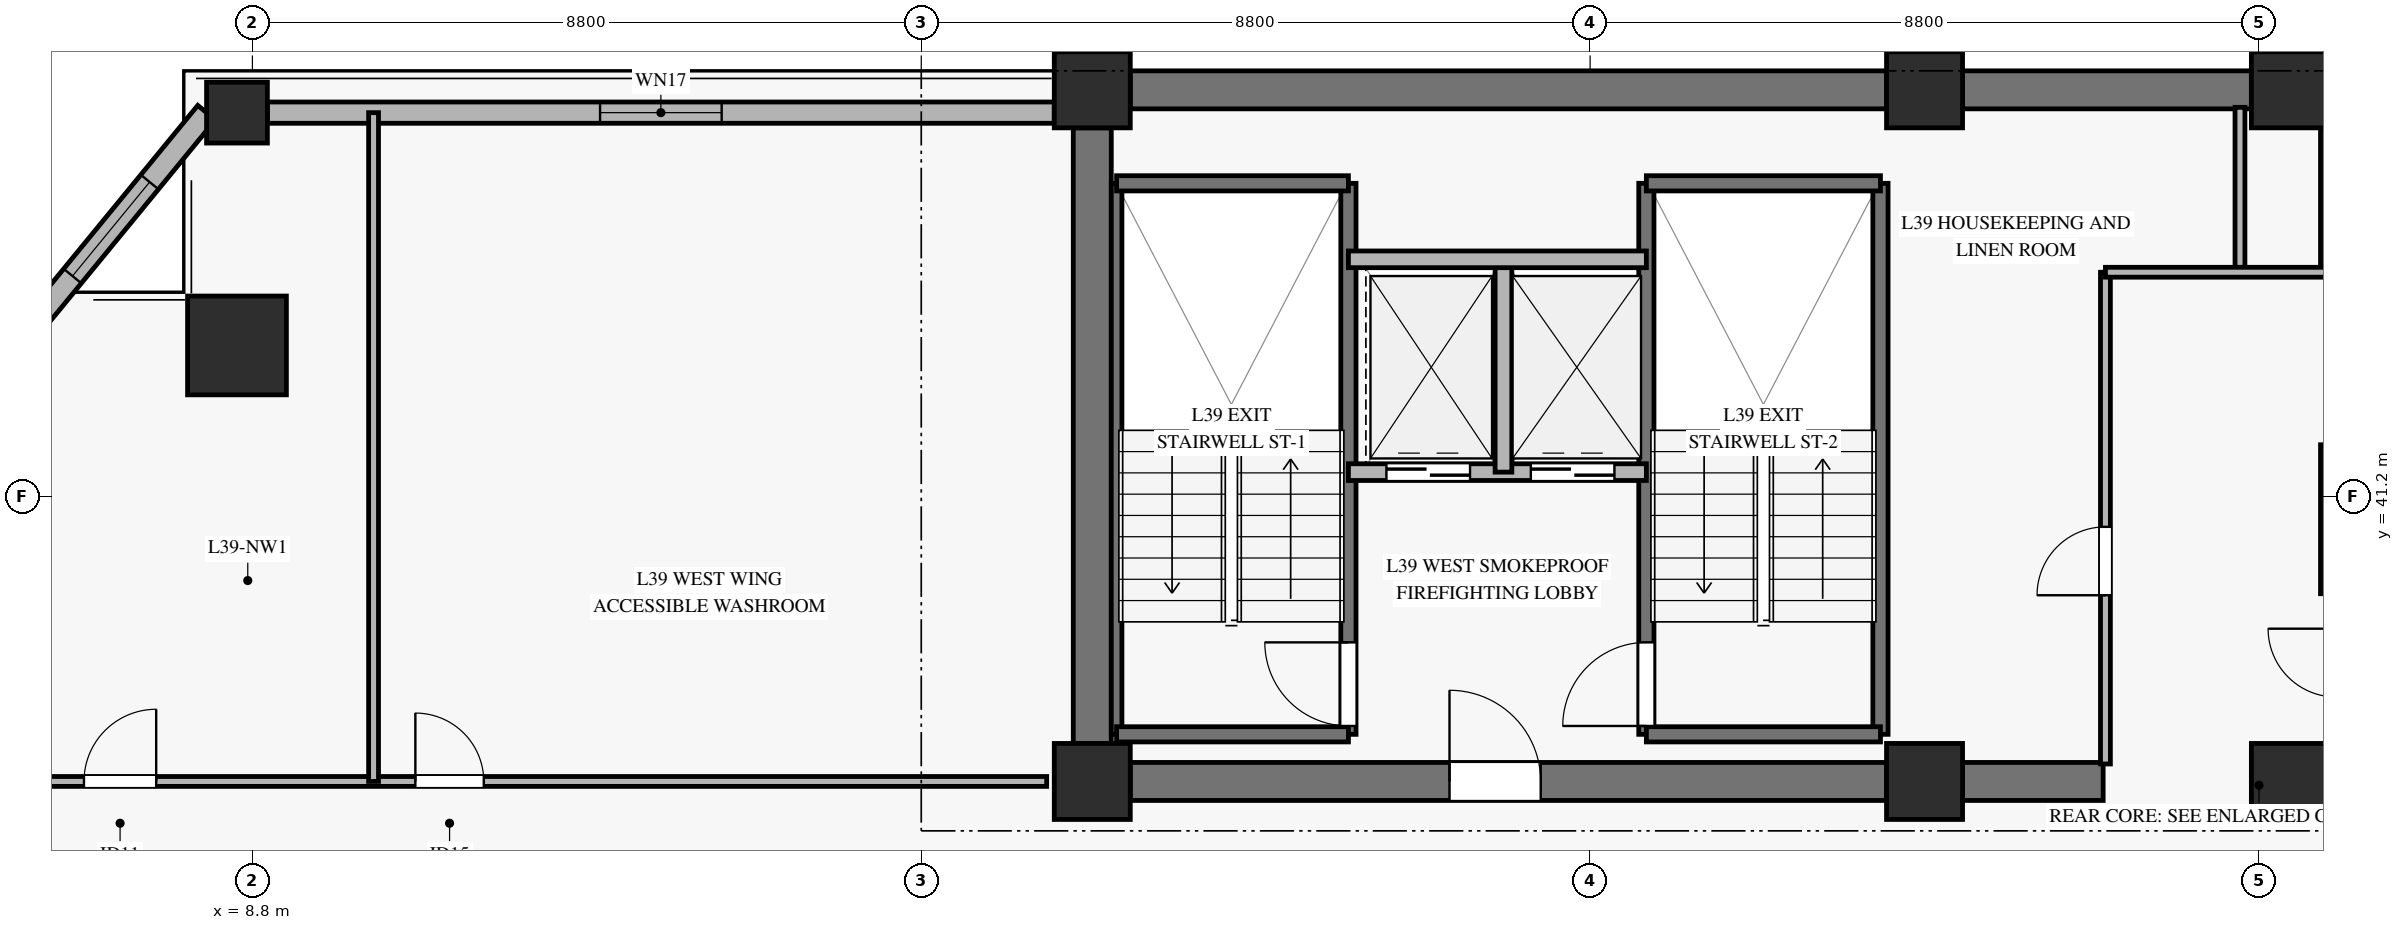
"""IFC4 building model, lengths in metres.
Left out: names, types, materials, properties, quantities, classifications, styles, units other than length and angle.
Written with IfcOpenShell. Run it as: python <this file> out.ifc"""

import sys

from ifc_helpers import new_model, si_unit, direction, frame, frame_2d, origin, origin_2d, place, context, subcontext, project, spatial, rectangle, hollow_rectangle, extrude, source, transform, mapped, element, fill, save


model = new_model("IFC4")
c1 = context("Model", 3, precision=1e-05, world=origin(), true_north=direction((0.0, 1.0)))
c2 = subcontext(c1, "Body", "Model", "MODEL_VIEW")
j1 = project(units=[si_unit("LENGTHUNIT", "METRE"), si_unit("PLANEANGLEUNIT", "RADIAN")], contexts=[c1])
p1 = place(None, origin())
s1 = spatial("IfcSite", under=j1, at=p1, CompositionType="ELEMENT")
p2 = place(p1, origin())
s2 = spatial("IfcBuilding", under=s1, at=p2, CompositionType="ELEMENT")
p3 = place(p2, frame((0.0, 0.0, 159.7)))
s3 = spatial("IfcBuildingStorey", under=s2, at=p3, CompositionType="ELEMENT", Elevation=159.7)
m1 = source(origin(), c2, "Body", "SweptSolid", [
    extrude(rectangle(XDim=1.0, YDim=1.0, at=origin_2d()), origin(), (0.0, 0.0, 1.0), 3.27),
])
for number, where, z_axis, x_axis in (
    (1, (19.85, 37.45, 0.0), (0.0, 0.0, 1.0), (1.0, 0.0, 0.0)),
    (2, (19.85, 46.55, 0.0), (0.0, 0.0, 1.0), (1.0, 0.0, 0.0)),
    (3, (30.8, 37.45, 0.0), (0.0, 0.0, 1.0), (1.0, 0.0, 0.0)),
    (4, (30.8, 46.55, 0.0), (0.0, 0.0, 1.0), (1.0, 0.0, 0.0)),
    (5, (35.6, 37.45, 0.0), (0.0, 0.0, 1.0), (1.0, 0.0, 0.0)),
    (6, (35.6, 46.55, 0.0), (0.0, 0.0, 1.0), (1.0, 0.0, 0.0)),
):
    element("IfcColumn", number, at=place(p3, frame(where, z_axis=z_axis, x_axis=x_axis)), inside=s3, PredefinedType="PILASTER", context=c2, shape_type="MappedRepresentation", body=[
        mapped(m1, transform((0.0, 0.0, 0.0), x_axis=(1.0, 0.0, 0.0), y_axis=(0.0, 1.0, 0.0), z_axis=(0.0, 0.0, 1.0), scale=1.0)),
    ])
p4 = place(p3, frame((20.35, 46.55, 0.0), z_axis=(0.0, 0.0, 1.0), x_axis=(1.0, 0.0, 0.0)))
e7 = element("IfcWall", 7, at=p4, inside=s3, PredefinedType="SHEAR", context=c2, shape_type="SweptSolid", body=[
    extrude(rectangle(XDim=9.95, YDim=0.5, at=frame_2d((4.975, 0.0))), origin(), (0.0, 0.0, 1.0), 3.27),
])
p5 = place(p3, frame((31.3, 46.55, 0.0), z_axis=(0.0, 0.0, 1.0), x_axis=(1.0, 0.0, 0.0)))
e8 = element("IfcWall", 8, at=p5, inside=s3, PredefinedType="SHEAR", context=c2, shape_type="SweptSolid", body=[
    extrude(rectangle(XDim=3.8, YDim=0.5, at=frame_2d((1.9, 0.0))), origin(), (0.0, 0.0, 1.0), 3.27),
])
p6 = place(p3, frame((20.35, 37.45, 0.0), z_axis=(0.0, 0.0, 1.0), x_axis=(1.0, 0.0, 0.0)))
e9 = element("IfcWall", 9, at=p6, inside=s3, PredefinedType="SHEAR", context=c2, shape_type="SweptSolid", body=[
    extrude(rectangle(XDim=9.95, YDim=0.5, at=frame_2d((4.975, 0.0))), origin(), (0.0, 0.0, 1.0), 3.27),
])
p7 = place(p6, frame((4.2, 0.0, 0.0)))
e10 = element("IfcOpeningElement", 10, at=p7, cuts=e9, PredefinedType="OPENING", context=c2, shape_type="SweptSolid", body=[
    extrude(rectangle(XDim=1.2, YDim=2.15, at=frame_2d((0.6, 1.075))), frame((0.0, 0.26, 0.0), z_axis=(0.0, -1.0, 0.0), x_axis=(1.0, 0.0, 0.0)), (0.0, 0.0, 1.0), 0.52),
])
p8 = place(p3, frame((31.3, 37.45, 0.0), z_axis=(0.0, 0.0, 1.0), x_axis=(1.0, 0.0, 0.0)))
e11 = element("IfcWall", 11, at=p8, inside=s3, PredefinedType="SHEAR", context=c2, shape_type="SweptSolid", body=[
    extrude(rectangle(XDim=1.85, YDim=0.5, at=frame_2d((0.925, 0.0))), origin(), (0.0, 0.0, 1.0), 3.27),
])
p9 = place(p3, frame((19.85, 37.95, 0.0), z_axis=(0.0, 0.0, 1.0), x_axis=(0.0, 1.0, 0.0)))
e12 = element("IfcWall", 12, at=p9, inside=s3, PredefinedType="SHEAR", context=c2, shape_type="SweptSolid", body=[
    extrude(rectangle(XDim=8.1, YDim=0.5, at=frame_2d((4.05, 0.0))), origin(), (0.0, 0.0, 1.0), 3.27),
])
m2 = source(origin(), c2, "Body", "SweptSolid", [
    extrude(hollow_rectangle(XDim=1.3, YDim=1.3, WallThickness=0.06, at=origin_2d()), origin(), (0.0, 0.0, 1.0), 3.27),
])
p10 = place(p3, frame((8.597, 43.187, 0.0), z_axis=(0.0, 0.0, 1.0), x_axis=(1.0, 0.0, 0.0)))
e13 = element("IfcColumn", 13, at=p10, inside=s3, PredefinedType="COLUMN", context=c2, shape_type="MappedRepresentation", body=[
    mapped(m2, transform((0.0, 0.0, 0.0), x_axis=(1.0, 0.0, 0.0), y_axis=(0.0, 1.0, 0.0), z_axis=(0.0, 0.0, 1.0), scale=1.0)),
])
m3 = source(origin(), c2, "Body", "SweptSolid", [
    extrude(hollow_rectangle(XDim=0.8, YDim=0.8, WallThickness=0.036, at=origin_2d()), origin(), (0.0, 0.0, 1.0), 3.27),
])
p11 = place(p3, frame((8.597, 46.25, 0.0), z_axis=(0.0, 0.0, 1.0), x_axis=(1.0, 0.0, 0.0)))
e14 = element("IfcColumn", 14, at=p11, inside=s3, PredefinedType="COLUMN", context=c2, shape_type="MappedRepresentation", body=[
    mapped(m3, transform((0.0, 0.0, 0.0), x_axis=(1.0, 0.0, 0.0), y_axis=(0.0, 1.0, 0.0), z_axis=(0.0, 0.0, 1.0), scale=1.0)),
])
p12 = place(p3, frame((8.997, 46.25, 0.0), z_axis=(0.0, 0.0, 1.0), x_axis=(1.0, 0.0, 0.0)))
e15 = element("IfcWall", 15, at=p12, inside=s3, PredefinedType="SOLIDWALL", context=c2, shape_type="SweptSolid", body=[
    extrude(rectangle(XDim=10.353, YDim=0.28, at=frame_2d((5.177, 0.0))), origin(), (0.0, 0.0, 1.0), 2.75),
])
p13 = place(p12, frame((4.377, 0.0, 0.45)))
e16 = element("IfcOpeningElement", 16, at=p13, cuts=e15, PredefinedType="OPENING", context=c2, shape_type="SweptSolid", body=[
    extrude(rectangle(XDim=1.6, YDim=2.0, at=frame_2d((0.8, 1.0))), frame((0.0, 0.15, 0.0), z_axis=(0.0, -1.0, 0.0), x_axis=(1.0, 0.0, 0.0)), (0.0, 0.0, 1.0), 0.3),
])
p14 = place(p3, frame((8.197, 46.25, 0.0), z_axis=(0.0, 0.0, 1.0), x_axis=(-0.634274117039, -0.773108235925, 0.0)))
e17 = element("IfcWall", 17, at=p14, inside=s3, PredefinedType="SOLIDWALL", context=c2, shape_type="SweptSolid", body=[
    extrude(rectangle(XDim=3.962, YDim=0.3, at=frame_2d((1.981, 0.0))), origin(), (0.0, 0.0, 1.0), 2.75),
])
p15 = place(p14, frame((1.181, 0.0, 0.45)))
e18 = element("IfcOpeningElement", 18, at=p15, cuts=e17, PredefinedType="OPENING", context=c2, shape_type="SweptSolid", body=[
    extrude(rectangle(XDim=1.6, YDim=2.0, at=frame_2d((0.8, 1.0))), frame((0.0, 0.16, 0.0), z_axis=(0.0, -1.0, 0.0), x_axis=(1.0, 0.0, 0.0)), (0.0, 0.0, 1.0), 0.32),
])
p16 = place(p3, frame((20.17, 38.07, 0.0), z_axis=(0.0, 0.0, 1.0), x_axis=(0.0, 1.0, 0.0)))
e19 = element("IfcWall", 19, at=p16, inside=s3, PredefinedType="SOLIDWALL", context=c2, shape_type="SweptSolid", body=[
    extrude(rectangle(XDim=7.25, YDim=0.14, at=frame_2d((3.625, 0.0))), origin(), (0.0, 0.0, 1.0), 3.5),
])
p17 = place(p3, frame((23.22, 38.07, 0.0), z_axis=(0.0, 0.0, 1.0), x_axis=(0.0, 1.0, 0.0)))
e20 = element("IfcWall", 20, at=p17, inside=s3, PredefinedType="SOLIDWALL", context=c2, shape_type="SweptSolid", body=[
    extrude(rectangle(XDim=7.25, YDim=0.2, at=frame_2d((3.625, 0.0))), origin(), (0.0, 0.0, 1.0), 3.5),
])
p18 = place(p17, frame((0.11, 0.0, 0.0)))
e21 = element("IfcOpeningElement", 21, at=p18, cuts=e20, PredefinedType="OPENING", context=c2, shape_type="SweptSolid", body=[
    extrude(rectangle(XDim=1.1, YDim=2.15, at=frame_2d((0.55, 1.075))), frame((0.0, 0.11, 0.0), z_axis=(0.0, -1.0, 0.0), x_axis=(1.0, 0.0, 0.0)), (0.0, 0.0, 1.0), 0.22),
])
for number, where, z_axis, x_axis in (
    (22, (20.17, 45.32, 0.0), (0.0, 0.0, 1.0), (1.0, 0.0, 0.0)),
    (23, (20.17, 38.07, 0.0), (0.0, 0.0, 1.0), (1.0, 0.0, 0.0)),
):
    element("IfcWall", number, at=place(p3, frame(where, z_axis=z_axis, x_axis=x_axis)), inside=s3, PredefinedType="SOLIDWALL", context=c2, shape_type="SweptSolid", body=[
        extrude(rectangle(XDim=3.05, YDim=0.2, at=frame_2d((1.525, 0.0))), origin(), (0.0, 0.0, 1.0), 3.5),
    ])
p19 = place(p3, frame((27.14, 38.07, 0.0), z_axis=(0.0, 0.0, 1.0), x_axis=(0.0, 1.0, 0.0)))
e24 = element("IfcWall", 24, at=p19, inside=s3, PredefinedType="SOLIDWALL", context=c2, shape_type="SweptSolid", body=[
    extrude(rectangle(XDim=7.25, YDim=0.2, at=frame_2d((3.625, 0.0))), origin(), (0.0, 0.0, 1.0), 3.5),
])
p20 = place(p19, frame((0.11, 0.0, 0.0)))
e25 = element("IfcOpeningElement", 25, at=p20, cuts=e24, PredefinedType="OPENING", context=c2, shape_type="SweptSolid", body=[
    extrude(rectangle(XDim=1.1, YDim=2.15, at=frame_2d((0.55, 1.075))), frame((0.0, 0.11, 0.0), z_axis=(0.0, -1.0, 0.0), x_axis=(1.0, 0.0, 0.0)), (0.0, 0.0, 1.0), 0.22),
])
p21 = place(p3, frame((30.22, 38.07, 0.0), z_axis=(0.0, 0.0, 1.0), x_axis=(0.0, 1.0, 0.0)))
e26 = element("IfcWall", 26, at=p21, inside=s3, PredefinedType="SOLIDWALL", context=c2, shape_type="SweptSolid", body=[
    extrude(rectangle(XDim=7.25, YDim=0.2, at=frame_2d((3.625, 0.0))), origin(), (0.0, 0.0, 1.0), 3.5),
])
for number, where, z_axis, x_axis in (
    (27, (27.14, 45.32, 0.0), (0.0, 0.0, 1.0), (1.0, 0.0, 0.0)),
    (28, (27.14, 38.07, 0.0), (0.0, 0.0, 1.0), (1.0, 0.0, 0.0)),
):
    element("IfcWall", number, at=place(p3, frame(where, z_axis=z_axis, x_axis=x_axis)), inside=s3, PredefinedType="SOLIDWALL", context=c2, shape_type="SweptSolid", body=[
        extrude(rectangle(XDim=3.08, YDim=0.2, at=frame_2d((1.54, 0.0))), origin(), (0.0, 0.0, 1.0), 3.5),
    ])
p22 = place(p3, frame((23.22, 41.52, 0.0), z_axis=(0.0, 0.0, 1.0), x_axis=(1.0, 0.0, 0.0)))
e29 = element("IfcWall", 29, at=p22, inside=s3, PredefinedType="SOLIDWALL", context=c2, shape_type="SweptSolid", body=[
    extrude(rectangle(XDim=3.92, YDim=0.22, at=frame_2d((1.96, 0.0))), origin(), (0.0, 0.0, 1.0), 3.27),
])
p23 = place(p22, frame((0.5, 0.0, 0.0)))
e30 = element("IfcOpeningElement", 30, at=p23, cuts=e29, PredefinedType="OPENING", context=c2, shape_type="SweptSolid", body=[
    extrude(rectangle(XDim=1.1, YDim=2.2, at=frame_2d((0.55, 1.1))), frame((0.0, 0.12, 0.0), z_axis=(0.0, -1.0, 0.0), x_axis=(1.0, 0.0, 0.0)), (0.0, 0.0, 1.0), 0.24),
])
p24 = place(p22, frame((2.4, 0.0, 0.0)))
e31 = element("IfcOpeningElement", 31, at=p24, cuts=e29, PredefinedType="OPENING", context=c2, shape_type="SweptSolid", body=[
    extrude(rectangle(XDim=1.1, YDim=2.2, at=frame_2d((0.55, 1.1))), frame((0.0, 0.12, 0.0), z_axis=(0.0, -1.0, 0.0), x_axis=(1.0, 0.0, 0.0)), (0.0, 0.0, 1.0), 0.24),
])
p25 = place(p3, frame((25.26, 41.52, 0.0), z_axis=(0.0, 0.0, 1.0), x_axis=(0.0, 1.0, 0.0)))
e32 = element("IfcWall", 32, at=p25, inside=s3, PredefinedType="SOLIDWALL", context=c2, shape_type="SweptSolid", body=[
    extrude(rectangle(XDim=2.8, YDim=0.22, at=frame_2d((1.4, 0.0))), origin(), (0.0, 0.0, 1.0), 3.27),
])
p26 = place(p3, frame((23.22, 44.32, 0.0), z_axis=(0.0, 0.0, 1.0), x_axis=(1.0, 0.0, 0.0)))
e33 = element("IfcWall", 33, at=p26, inside=s3, PredefinedType="SOLIDWALL", context=c2, shape_type="SweptSolid", body=[
    extrude(rectangle(XDim=3.92, YDim=0.22, at=frame_2d((1.96, 0.0))), origin(), (0.0, 0.0, 1.0), 3.27),
])
p27 = place(p3, frame((36.12, 39.92, 0.0), z_axis=(0.0, 0.0, 1.0), x_axis=(0.0, 1.0, 0.0)))
e34 = element("IfcWall", 34, at=p27, inside=s3, PredefinedType="SOLIDWALL", context=c2, shape_type="SweptSolid", body=[
    extrude(rectangle(XDim=1.96, YDim=0.22, at=frame_2d((0.98, 0.0))), origin(), (0.0, 0.0, 1.0), 3.27),
])
p28 = place(p3, frame((36.12, 44.22, 0.0), z_axis=(0.0, 0.0, 1.0), x_axis=(0.0, 1.0, 0.0)))
e35 = element("IfcWall", 35, at=p28, inside=s3, PredefinedType="SOLIDWALL", context=c2, shape_type="SweptSolid", body=[
    extrude(rectangle(XDim=2.1, YDim=0.22, at=frame_2d((1.05, 0.0))), origin(), (0.0, 0.0, 1.0), 3.27),
])
p29 = place(p3, frame((33.18, 37.68, 0.0), z_axis=(0.0, 0.0, 1.0), x_axis=(0.0, 1.0, 0.0)))
e36 = element("IfcWall", 36, at=p29, inside=s3, PredefinedType="PARTITIONING", context=c2, shape_type="SweptSolid", body=[
    extrude(rectangle(XDim=6.47, YDim=0.13, at=frame_2d((3.235, 0.0))), origin(), (0.0, 0.0, 1.0), 2.355),
])
p30 = place(p29, frame((2.22, 0.0, 0.0)))
e37 = element("IfcOpeningElement", 37, at=p30, cuts=e36, PredefinedType="OPENING", context=c2, shape_type="SweptSolid", body=[
    extrude(rectangle(XDim=0.9, YDim=2.1, at=frame_2d((0.45, 1.05))), frame((0.0, 0.075, 0.0), z_axis=(0.0, -1.0, 0.0), x_axis=(1.0, 0.0, 0.0)), (0.0, 0.0, 1.0), 0.15),
])
p31 = place(p3, frame((34.95, 44.15, 0.0), z_axis=(0.0, 0.0, 1.0), x_axis=(0.0, 1.0, 0.0)))
e38 = element("IfcWall", 38, at=p31, inside=s3, PredefinedType="PARTITIONING", context=c2, shape_type="SweptSolid", body=[
    extrude(rectangle(XDim=2.17, YDim=0.13, at=frame_2d((1.085, 0.0))), origin(), (0.0, 0.0, 1.0), 3.27),
])
p32 = place(p3, frame((33.18, 44.15, 0.0), z_axis=(0.0, 0.0, 1.0), x_axis=(1.0, 0.0, 0.0)))
e39 = element("IfcWall", 39, at=p32, inside=s3, PredefinedType="PARTITIONING", context=c2, shape_type="SweptSolid", body=[
    extrude(rectangle(XDim=2.97, YDim=0.13, at=frame_2d((1.485, 0.0))), origin(), (0.0, 0.0, 1.0), 2.555),
])
p33 = place(p3, frame((5.684, 37.45, 0.0), z_axis=(0.0, 0.0, 1.0), x_axis=(1.0, 0.0, 0.0)))
e40 = element("IfcWall", 40, at=p33, inside=s3, PredefinedType="PARTITIONING", context=c2, shape_type="SweptSolid", body=[
    extrude(rectangle(XDim=13.566, YDim=0.13, at=frame_2d((6.783, 0.0))), origin(), (0.0, 0.0, 1.0), 2.755),
])
p34 = place(p33, frame((0.9, 0.0, 0.0)))
e41 = element("IfcOpeningElement", 41, at=p34, cuts=e40, PredefinedType="OPENING", context=c2, shape_type="SweptSolid", body=[
    extrude(rectangle(XDim=0.95, YDim=2.1, at=frame_2d((0.475, 1.05))), frame((0.0, 0.075, 0.0), z_axis=(0.0, -1.0, 0.0), x_axis=(1.0, 0.0, 0.0)), (0.0, 0.0, 1.0), 0.15),
])
p35 = place(p33, frame((5.26, 0.0, 0.0)))
e42 = element("IfcOpeningElement", 42, at=p35, cuts=e40, PredefinedType="OPENING", context=c2, shape_type="SweptSolid", body=[
    extrude(rectangle(XDim=0.9, YDim=2.1, at=frame_2d((0.45, 1.05))), frame((0.0, 0.075, 0.0), z_axis=(0.0, -1.0, 0.0), x_axis=(1.0, 0.0, 0.0)), (0.0, 0.0, 1.0), 0.15),
])
p36 = place(p3, frame((10.394, 37.45, 0.0), z_axis=(0.0, 0.0, 1.0), x_axis=(0.0, 1.0, 0.0)))
e43 = element("IfcWall", 43, at=p36, inside=s3, PredefinedType="PARTITIONING", context=c2, shape_type="SweptSolid", body=[
    extrude(rectangle(XDim=8.8, YDim=0.13, at=frame_2d((4.4, 0.0))), origin(), (0.0, 0.0, 1.0), 3.27),
])
m4 = source(origin(), c2, "Body", "SweptSolid", [
    extrude(rectangle(XDim=1.6, YDim=2.0, at=frame_2d((0.8, 1.0))), frame((0.0, 0.03, 0.0), z_axis=(0.0, -1.0, 0.0), x_axis=(1.0, 0.0, 0.0)), (0.0, 0.0, 1.0), 0.06),
])
p37 = place(p13, origin())
e44 = element("IfcWindow", 44, at=p37, inside=s3, PartitioningType="SINGLE_PANEL", PredefinedType="WINDOW", context=c2, shape_type="MappedRepresentation", body=[
    mapped(m4, transform((0.0, 0.0, 0.0), x_axis=(1.0, 0.0, 0.0), y_axis=(0.0, 1.0, 0.0), z_axis=(0.0, 0.0, 1.0), scale=1.0)),
])
fill(e16, e44)
p38 = place(p15, origin())
e45 = element("IfcWindow", 45, at=p38, inside=s3, PartitioningType="SINGLE_PANEL", PredefinedType="WINDOW", context=c2, shape_type="MappedRepresentation", body=[
    mapped(m4, transform((0.0, 0.0, 0.0), x_axis=(1.0, 0.0, 0.0), y_axis=(0.0, 1.0, 0.0), z_axis=(0.0, 0.0, 1.0), scale=1.0)),
])
fill(e18, e45)
m5 = source(origin(), c2, "Body", "SweptSolid", [
    extrude(rectangle(XDim=1.1, YDim=2.15, at=frame_2d((0.55, 1.075))), frame((0.0, 0.025, 0.0), z_axis=(0.0, -1.0, 0.0), x_axis=(1.0, 0.0, 0.0)), (0.0, 0.0, 1.0), 0.05),
])
p39 = place(p18, origin())
e46 = element("IfcDoor", 46, at=p39, inside=s3, OperationType="SINGLE_SWING_RIGHT", PredefinedType="DOOR", context=c2, shape_type="MappedRepresentation", body=[
    mapped(m5, transform((0.0, 0.0, 0.0), x_axis=(1.0, 0.0, 0.0), y_axis=(0.0, 1.0, 0.0), z_axis=(0.0, 0.0, 1.0), scale=1.0)),
])
fill(e21, e46)
p40 = place(p20, origin())
e47 = element("IfcDoor", 47, at=p40, inside=s3, OperationType="SINGLE_SWING_LEFT", PredefinedType="DOOR", context=c2, shape_type="MappedRepresentation", body=[
    mapped(m5, transform((0.0, 0.0, 0.0), x_axis=(1.0, 0.0, 0.0), y_axis=(0.0, 1.0, 0.0), z_axis=(0.0, 0.0, 1.0), scale=1.0)),
])
fill(e25, e47)
m6 = source(origin(), c2, "Body", "SweptSolid", [
    extrude(rectangle(XDim=1.1, YDim=2.2, at=frame_2d((0.55, 1.1))), frame((0.0, 0.025, 0.0), z_axis=(0.0, -1.0, 0.0), x_axis=(1.0, 0.0, 0.0)), (0.0, 0.0, 1.0), 0.05),
])
p41 = place(p23, origin())
e48 = element("IfcDoor", 48, at=p41, inside=s3, OperationType="SLIDING_TO_LEFT", PredefinedType="DOOR", context=c2, shape_type="MappedRepresentation", body=[
    mapped(m6, transform((0.0, 0.0, 0.0), x_axis=(1.0, 0.0, 0.0), y_axis=(0.0, 1.0, 0.0), z_axis=(0.0, 0.0, 1.0), scale=1.0)),
])
fill(e30, e48)
p42 = place(p24, origin())
e49 = element("IfcDoor", 49, at=p42, inside=s3, OperationType="SLIDING_TO_LEFT", PredefinedType="DOOR", context=c2, shape_type="MappedRepresentation", body=[
    mapped(m6, transform((0.0, 0.0, 0.0), x_axis=(1.0, 0.0, 0.0), y_axis=(0.0, 1.0, 0.0), z_axis=(0.0, 0.0, 1.0), scale=1.0)),
])
fill(e31, e49)
m7 = source(origin(), c2, "Body", "SweptSolid", [
    extrude(rectangle(XDim=1.2, YDim=2.15, at=frame_2d((0.6, 1.075))), frame((0.0, 0.025, 0.0), z_axis=(0.0, -1.0, 0.0), x_axis=(1.0, 0.0, 0.0)), (0.0, 0.0, 1.0), 0.05),
])
p43 = place(p7, origin())
e50 = element("IfcDoor", 50, at=p43, inside=s3, OperationType="SINGLE_SWING_LEFT", PredefinedType="DOOR", context=c2, shape_type="MappedRepresentation", body=[
    mapped(m7, transform((0.0, 0.0, 0.0), x_axis=(1.0, 0.0, 0.0), y_axis=(0.0, 1.0, 0.0), z_axis=(0.0, 0.0, 1.0), scale=1.0)),
])
fill(e10, e50)
m8 = source(origin(), c2, "Body", "SweptSolid", [
    extrude(rectangle(XDim=0.9, YDim=2.1, at=frame_2d((0.45, 1.05))), frame((0.0, 0.025, 0.0), z_axis=(0.0, -1.0, 0.0), x_axis=(1.0, 0.0, 0.0)), (0.0, 0.0, 1.0), 0.05),
])
p44 = place(p30, origin())
e51 = element("IfcDoor", 51, at=p44, inside=s3, OperationType="SINGLE_SWING_LEFT", PredefinedType="DOOR", context=c2, shape_type="MappedRepresentation", body=[
    mapped(m8, transform((0.0, 0.0, 0.0), x_axis=(1.0, 0.0, 0.0), y_axis=(0.0, 1.0, 0.0), z_axis=(0.0, 0.0, 1.0), scale=1.0)),
])
fill(e37, e51)
m9 = source(origin(), c2, "Body", "SweptSolid", [
    extrude(rectangle(XDim=0.95, YDim=2.1, at=frame_2d((0.475, 1.05))), frame((0.0, 0.025, 0.0), z_axis=(0.0, -1.0, 0.0), x_axis=(1.0, 0.0, 0.0)), (0.0, 0.0, 1.0), 0.05),
])
p45 = place(p34, origin())
e52 = element("IfcDoor", 52, at=p45, inside=s3, OperationType="SINGLE_SWING_RIGHT", PredefinedType="DOOR", context=c2, shape_type="MappedRepresentation", body=[
    mapped(m9, transform((0.0, 0.0, 0.0), x_axis=(1.0, 0.0, 0.0), y_axis=(0.0, 1.0, 0.0), z_axis=(0.0, 0.0, 1.0), scale=1.0)),
])
fill(e41, e52)
p46 = place(p35, origin())
e53 = element("IfcDoor", 53, at=p46, inside=s3, OperationType="SINGLE_SWING_LEFT", PredefinedType="DOOR", context=c2, shape_type="MappedRepresentation", body=[
    mapped(m8, transform((0.0, 0.0, 0.0), x_axis=(1.0, 0.0, 0.0), y_axis=(0.0, 1.0, 0.0), z_axis=(0.0, 0.0, 1.0), scale=1.0)),
])
fill(e42, e53)
save(model, sys.argv[1])
